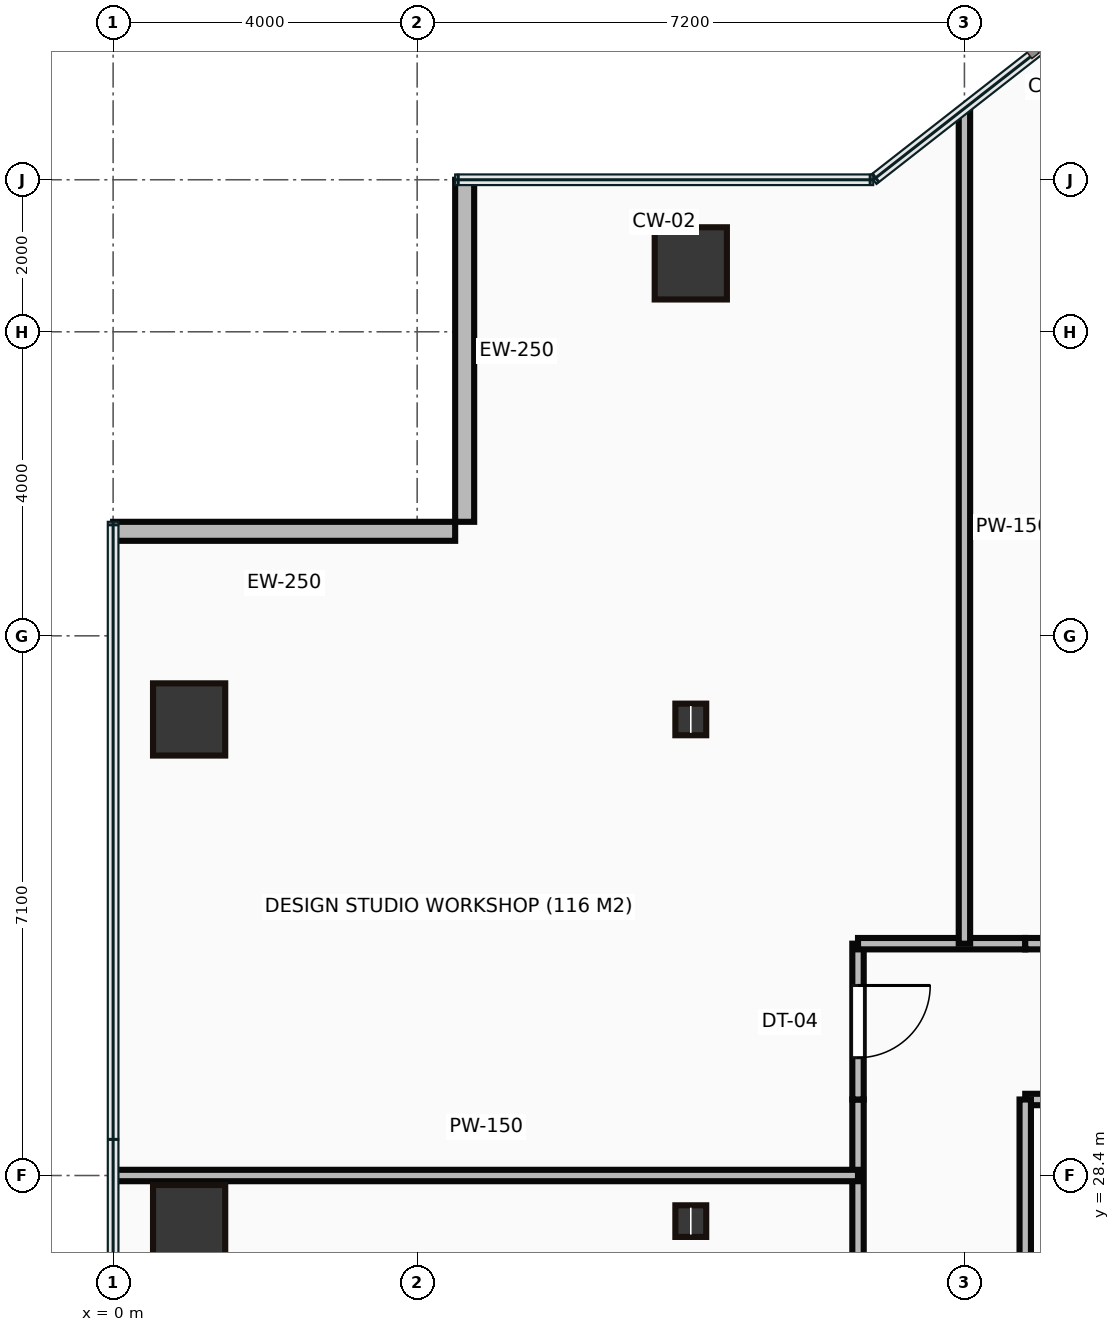
"""IFC4 building model, lengths in metres.
Left out: names, types, materials, properties, quantities, classifications, styles, units other than length and angle.
Written with IfcOpenShell. Run it as: python <this file> out.ifc"""

import sys

from ifc_helpers import new_model, si_unit, direction, frame, frame_2d, origin, origin_2d, place, context, subcontext, project, spatial, rectangle, hollow_rectangle, i_section, extrude, source, transform, mapped, element, fill, save


model = new_model("IFC4")
c1 = context("Model", 3, precision=1e-05, world=origin(), true_north=direction((0.0, 1.0)))
c2 = subcontext(c1, "Body", "Model", "MODEL_VIEW")
j1 = project(units=[si_unit("LENGTHUNIT", "METRE"), si_unit("PLANEANGLEUNIT", "RADIAN")], contexts=[c1])
p1 = place(None, origin())
s1 = spatial("IfcSite", under=j1, at=p1, CompositionType="ELEMENT")
p2 = place(p1, origin())
s2 = spatial("IfcBuilding", under=s1, at=p2, CompositionType="ELEMENT")
p3 = place(p2, frame((0.0, 0.0, 36.15)))
s3 = spatial("IfcBuildingStorey", under=s2, at=p3, CompositionType="ELEMENT", Elevation=36.15)
m1 = source(origin(), c2, "Body", "SweptSolid", [
    extrude(hollow_rectangle(XDim=0.95, YDim=0.95, WallThickness=0.045, at=origin_2d()), origin(), (0.0, 0.0, 1.0), 3.65),
])
for number, where, z_axis, x_axis in (
    (1, (1.0, 27.8, 0.0), (0.0, 0.0, 1.0), (1.0, 0.0, 0.0)),
    (2, (1.0, 34.4, 0.0), (0.0, 0.0, 1.0), (1.0, 0.0, 0.0)),
):
    element("IfcColumn", number, at=place(p3, frame(where, z_axis=z_axis, x_axis=x_axis)), inside=s3, PredefinedType="COLUMN", context=c2, shape_type="MappedRepresentation", body=[
        mapped(m1, transform((0.0, 0.0, 0.0))),
    ])
m2 = source(origin(), c2, "Body", "SweptSolid", [
    extrude(i_section(OverallWidth=0.406, OverallDepth=0.416, WebThickness=0.03, FlangeThickness=0.048, at=origin_2d()), origin(), (0.0, 0.0, 1.0), 3.65),
])
for number, where, z_axis, x_axis in (
    (3, (7.6, 27.8, 0.0), (0.0, 0.0, 1.0), (1.0, 0.0, 0.0)),
    (4, (7.6, 34.4, 0.0), (0.0, 0.0, 1.0), (1.0, 0.0, 0.0)),
):
    element("IfcColumn", number, at=place(p3, frame(where, z_axis=z_axis, x_axis=x_axis)), inside=s3, PredefinedType="COLUMN", context=c2, shape_type="MappedRepresentation", body=[
        mapped(m2, transform((0.0, 0.0, 0.0))),
    ])
p4 = place(p3, frame((7.6, 40.4, 0.0), z_axis=(0.0, 0.0, 1.0), x_axis=(1.0, 0.0, 0.0)))
e5 = element("IfcColumn", 5, at=p4, inside=s3, PredefinedType="COLUMN", context=c2, shape_type="MappedRepresentation", body=[
    mapped(m1, transform((0.0, 0.0, 0.0))),
])
m3 = source(origin(), c2, "Body", "SweptSolid", [
    extrude(rectangle(XDim=4.5, YDim=0.25, at=frame_2d((2.25, 0.0))), origin(), (0.0, 0.0, 1.0), 3.4),
])
for number, where, z_axis, x_axis in (
    (6, (4.625, 41.5, 0.0), (0.0, 0.0, 1.0), (0.0, -1.0, 0.0)),
    (7, (4.5, 36.875, 0.0), (0.0, 0.0, 1.0), (-1.0, 0.0, 0.0)),
):
    element("IfcWall", number, at=place(p3, frame(where, z_axis=z_axis, x_axis=x_axis)), inside=s3, PredefinedType="STANDARD", context=c2, shape_type="MappedRepresentation", body=[
        mapped(m3, transform((0.0, 0.0, 0.0))),
    ])
m4 = source(origin(), c2, "Body", "SweptSolid", [
    extrude(rectangle(XDim=13.15, YDim=0.15, at=frame_2d((6.575, 0.0))), origin(), (0.0, 0.0, 1.0), 3.4),
])
p5 = place(p3, frame((9.8, 16.25, 0.0), z_axis=(0.0, 0.0, 1.0), x_axis=(0.0, 1.0, 0.0)))
e8 = element("IfcWall", 8, at=p5, inside=s3, PredefinedType="PARTITIONING", context=c2, shape_type="MappedRepresentation", body=[
    mapped(m4, transform((0.0, 0.0, 0.0))),
])
p6 = place(p5, frame((5.73, 0.0, 0.0)))
e9 = element("IfcOpeningElement", 9, at=p6, cuts=e8, PredefinedType="OPENING", context=c2, shape_type="SweptSolid", body=[
    extrude(rectangle(XDim=0.95, YDim=2.15, at=frame_2d((0.475, 1.075))), frame((0.0, 0.085, 0.0), z_axis=(0.0, -1.0, 0.0), x_axis=(1.0, 0.0, 0.0)), (0.0, 0.0, 1.0), 0.17),
])
m5 = source(origin(), c2, "Body", "SweptSolid", [
    extrude(rectangle(XDim=2.05, YDim=0.15, at=frame_2d((1.025, 0.0))), origin(), (0.0, 0.0, 1.0), 3.4),
])
p7 = place(p3, frame((9.8, 29.4, 0.0), z_axis=(0.0, 0.0, 1.0), x_axis=(0.0, 1.0, 0.0)))
e10 = element("IfcWall", 10, at=p7, inside=s3, PredefinedType="PARTITIONING", context=c2, shape_type="MappedRepresentation", body=[
    mapped(m5, transform((0.0, 0.0, 0.0))),
])
p8 = place(p7, frame((0.55, 0.0, 0.0)))
e11 = element("IfcOpeningElement", 11, at=p8, cuts=e10, PredefinedType="OPENING", context=c2, shape_type="SweptSolid", body=[
    extrude(rectangle(XDim=0.95, YDim=2.15, at=frame_2d((0.475, 1.075))), frame((0.0, 0.085, 0.0), z_axis=(0.0, -1.0, 0.0), x_axis=(1.0, 0.0, 0.0)), (0.0, 0.0, 1.0), 0.17),
])
m6 = source(origin(), c2, "Body", "SweptSolid", [
    extrude(rectangle(XDim=2.2, YDim=0.15, at=frame_2d((1.1, 0.0))), origin(), (0.0, 0.0, 1.0), 3.4),
])
p9 = place(p3, frame((9.8, 31.45, 0.0), z_axis=(0.0, 0.0, 1.0), x_axis=(1.0, 0.0, 0.0)))
e12 = element("IfcWall", 12, at=p9, inside=s3, PredefinedType="PARTITIONING", context=c2, shape_type="MappedRepresentation", body=[
    mapped(m6, transform((0.0, 0.0, 0.0))),
])
m7 = source(origin(), c2, "Body", "SweptSolid", [
    extrude(rectangle(XDim=25.2, YDim=0.15, at=frame_2d((12.6, 0.0))), origin(), (0.0, 0.0, 1.0), 3.4),
])
p10 = place(p3, frame((12.0, 31.45, 0.0), z_axis=(0.0, 0.0, 1.0), x_axis=(1.0, 0.0, 0.0)))
e13 = element("IfcWall", 13, at=p10, inside=s3, PredefinedType="PARTITIONING", context=c2, shape_type="MappedRepresentation", body=[
    mapped(m7, transform((0.0, 0.0, 0.0))),
])
p11 = place(p10, frame((4.655, 0.0, 0.0)))
e14 = element("IfcOpeningElement", 14, at=p11, cuts=e13, PredefinedType="OPENING", context=c2, shape_type="SweptSolid", body=[
    extrude(rectangle(XDim=0.95, YDim=2.15, at=frame_2d((0.475, 1.075))), frame((0.0, 0.085, 0.0), z_axis=(0.0, -1.0, 0.0), x_axis=(1.0, 0.0, 0.0)), (0.0, 0.0, 1.0), 0.17),
])
p12 = place(p10, frame((14.925, 0.0, 0.0)))
e15 = element("IfcOpeningElement", 15, at=p12, cuts=e13, PredefinedType="OPENING", context=c2, shape_type="SweptSolid", body=[
    extrude(rectangle(XDim=0.95, YDim=2.15, at=frame_2d((0.475, 1.075))), frame((0.0, 0.085, 0.0), z_axis=(0.0, -1.0, 0.0), x_axis=(1.0, 0.0, 0.0)), (0.0, 0.0, 1.0), 0.17),
])
p13 = place(p10, frame((22.395, 0.0, 0.0)))
e16 = element("IfcOpeningElement", 16, at=p13, cuts=e13, PredefinedType="OPENING", context=c2, shape_type="SweptSolid", body=[
    extrude(rectangle(XDim=0.95, YDim=2.15, at=frame_2d((0.475, 1.075))), frame((0.0, 0.085, 0.0), z_axis=(0.0, -1.0, 0.0), x_axis=(1.0, 0.0, 0.0)), (0.0, 0.0, 1.0), 0.17),
])
p14 = place(p3, frame((37.2, 29.4, 0.0), z_axis=(0.0, 0.0, 1.0), x_axis=(-1.0, 0.0, 0.0)))
e17 = element("IfcWall", 17, at=p14, inside=s3, PredefinedType="PARTITIONING", context=c2, shape_type="MappedRepresentation", body=[
    mapped(m7, transform((0.0, 0.0, 0.0))),
])
p15 = place(p3, frame((12.0, 29.4, 0.0), z_axis=(0.0, 0.0, 1.0), x_axis=(0.0, -1.0, 0.0)))
e18 = element("IfcWall", 18, at=p15, inside=s3, PredefinedType="PARTITIONING", context=c2, shape_type="MappedRepresentation", body=[
    mapped(m4, transform((0.0, 0.0, 0.0))),
])
p16 = place(p15, frame((6.1, 0.0, 0.0)))
e19 = element("IfcOpeningElement", 19, at=p16, cuts=e18, PredefinedType="OPENING", context=c2, shape_type="SweptSolid", body=[
    extrude(rectangle(XDim=0.95, YDim=2.15, at=frame_2d((0.475, 1.075))), frame((0.0, 0.085, 0.0), z_axis=(0.0, -1.0, 0.0), x_axis=(1.0, 0.0, 0.0)), (0.0, 0.0, 1.0), 0.17),
])
m8 = source(origin(), c2, "Body", "SweptSolid", [
    extrude(rectangle(XDim=9.78, YDim=0.15, at=frame_2d((4.89, 0.0))), origin(), (0.0, 0.0, 1.0), 3.4),
])
p17 = place(p3, frame((0.02, 28.4, 0.0), z_axis=(0.0, 0.0, 1.0), x_axis=(1.0, 0.0, 0.0)))
e20 = element("IfcWall", 20, at=p17, inside=s3, PredefinedType="PARTITIONING", context=c2, shape_type="MappedRepresentation", body=[
    mapped(m8, transform((0.0, 0.0, 0.0))),
])
m9 = source(origin(), c2, "Body", "SweptSolid", [
    extrude(rectangle(XDim=10.963, YDim=0.15, at=frame_2d((5.482, 0.0))), origin(), (0.0, 0.0, 1.0), 3.4),
])
p18 = place(p3, frame((11.2, 42.413, 0.0), z_axis=(0.0, 0.0, 1.0), x_axis=(0.0, -1.0, 0.0)))
e21 = element("IfcWall", 21, at=p18, inside=s3, PredefinedType="PARTITIONING", context=c2, shape_type="MappedRepresentation", body=[
    mapped(m9, transform((0.0, 0.0, 0.0))),
])
m10 = source(origin(), c2, "Body", "SweptSolid", [
    extrude(rectangle(XDim=0.95, YDim=2.15, at=frame_2d((0.475, 1.075))), frame((0.0, 0.025, 0.0), z_axis=(0.0, -1.0, 0.0), x_axis=(1.0, 0.0, 0.0)), (0.0, 0.0, 1.0), 0.05),
])
p19 = place(p8, origin())
e22 = element("IfcDoor", 22, at=p19, inside=s3, OperationType="SINGLE_SWING_RIGHT", PredefinedType="DOOR", context=c2, shape_type="MappedRepresentation", body=[
    mapped(m10, transform((0.0, 0.0, 0.0))),
])
fill(e11, e22)
save(model, sys.argv[1])
